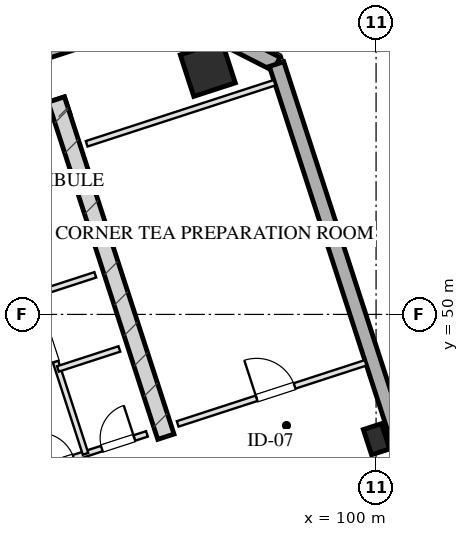
"""IFC4 building model, lengths in metres.
Left out: names, types, materials, properties, quantities, classifications, styles, units other than length and angle.
Written with IfcOpenShell. Run it as: python <this file> out.ifc"""

import sys

from ifc_helpers import new_model, si_unit, direction, frame, frame_2d, origin, origin_2d, place, context, subcontext, project, spatial, rectangle, hollow_rectangle, extrude, element, fill, save


model = new_model("IFC4")
c1 = context("Model", 3, precision=1e-05, world=origin(), true_north=direction((0.0, 1.0)))
c2 = subcontext(c1, "Body", "Model", "MODEL_VIEW")
j1 = project(units=[si_unit("LENGTHUNIT", "METRE"), si_unit("PLANEANGLEUNIT", "RADIAN")], contexts=[c1])
p1 = place(None, origin())
s1 = spatial("IfcSite", under=j1, at=p1, CompositionType="ELEMENT")
p2 = place(p1, origin())
s2 = spatial("IfcBuilding", under=s1, at=p2, CompositionType="ELEMENT")
p3 = place(p2, frame((0.0, 0.0, 209.3)))
s3 = spatial("IfcBuildingStorey", under=s2, at=p3, CompositionType="ELEMENT", Elevation=209.3)
p4 = place(p3, frame((76.415, 50.489, 0.0), z_axis=(0.0, 0.0, 1.0), x_axis=(0.951056810414, 0.309016089169, 0.0)))
e1 = element("IfcWall", 1, at=p4, inside=s3, PredefinedType="SHEAR", context=c2, shape_type="SweptSolid", body=[
    extrude(rectangle(XDim=16.25, YDim=0.45, at=frame_2d((8.125, 0.0))), origin(), (0.0, 0.0, 1.0), 3.45),
])
p5 = place(p3, frame((94.469, 46.781, 0.0), z_axis=(0.0, 0.0, 1.0), x_axis=(-0.309004419953, 0.951060601881, 0.0)))
e2 = element("IfcWall", 2, at=p5, inside=s3, PredefinedType="SHEAR", context=c2, shape_type="SweptSolid", body=[
    extrude(rectangle(XDim=9.33, YDim=0.45, at=frame_2d((4.665, 0.0))), origin(), (0.0, 0.0, 1.0), 3.45),
])
p6 = place(p3, frame((95.572, 56.461, 0.0), z_axis=(0.0, 0.0, 1.0), x_axis=(0.951056516295, 0.309016994375, 0.0)))
e3 = element("IfcColumn", 3, at=p6, inside=s3, PredefinedType="COLUMN", context=c2, shape_type="SweptSolid", body=[
    extrude(hollow_rectangle(XDim=1.15, YDim=1.15, WallThickness=0.04, at=origin_2d()), origin(), (0.0, 0.0, 1.0), 3.451),
])
p7 = place(p3, frame((100.01, 46.716, 0.0), z_axis=(0.0, 0.0, 1.0), x_axis=(0.951056516295, 0.309016994375, 0.0)))
e4 = element("IfcColumn", 4, at=p7, inside=s3, PredefinedType="COLUMN", context=c2, shape_type="SweptSolid", body=[
    extrude(hollow_rectangle(XDim=0.5, YDim=0.7, WallThickness=0.025, at=origin_2d()), origin(), (0.0, 0.0, 1.0), 3.451),
])
p8 = place(p3, frame((72.165, 50.706, 0.0), z_axis=(0.0, 0.0, 1.0), x_axis=(0.951058012937, 0.309012388148, 0.0)))
e5 = element("IfcWall", 5, at=p8, inside=s3, PredefinedType="SOLIDWALL", context=c2, shape_type="SweptSolid", body=[
    extrude(rectangle(XDim=23.6, YDim=0.4, at=frame_2d((11.8, 0.0))), origin(), (0.0, 0.0, 1.0), 2.61),
])
p9 = place(p3, frame((94.61, 57.999, 0.0), z_axis=(0.0, 0.0, 1.0), x_axis=(0.890979603174, -0.454043331334, 0.0)))
e6 = element("IfcWall", 6, at=p9, inside=s3, PredefinedType="SOLIDWALL", context=c2, shape_type="SweptSolid", body=[
    extrude(rectangle(XDim=3.111, YDim=0.4, at=frame_2d((1.556, 0.0))), origin(), (0.0, 0.0, 1.0), 2.61),
])
p10 = place(p3, frame((97.382, 56.586, 0.0), z_axis=(0.0, 0.0, 1.0), x_axis=(0.309016491071, -0.951056679828, 0.0)))
e7 = element("IfcWall", 7, at=p10, inside=s3, PredefinedType="SOLIDWALL", context=c2, shape_type="SweptSolid", body=[
    extrude(rectangle(XDim=38.4, YDim=0.4, at=frame_2d((19.2, 0.0))), origin(), (0.0, 0.0, 1.0), 2.61),
])
p11 = place(p10, frame((15.55, 0.0, 0.75)))
e8 = element("IfcOpeningElement", 8, at=p11, cuts=e7, PredefinedType="OPENING", context=c2, shape_type="SweptSolid", body=[
    extrude(rectangle(XDim=2.1, YDim=1.46, at=frame_2d((1.05, 0.73))), frame((0.0, 0.21, 0.0), z_axis=(0.0, -1.0, 0.0), x_axis=(1.0, 0.0, 0.0)), (0.0, 0.0, 1.0), 0.42),
])
p12 = place(p10, frame((11.75, 0.0, 0.75)))
e9 = element("IfcOpeningElement", 9, at=p12, cuts=e7, PredefinedType="OPENING", context=c2, shape_type="SweptSolid", body=[
    extrude(rectangle(XDim=2.1, YDim=1.46, at=frame_2d((1.05, 0.73))), frame((0.0, 0.21, 0.0), z_axis=(0.0, -1.0, 0.0), x_axis=(1.0, 0.0, 0.0)), (0.0, 0.0, 1.0), 0.42),
])
p13 = place(p10, frame((23.05, 0.0, 0.0)))
e10 = element("IfcOpeningElement", 10, at=p13, cuts=e7, PredefinedType="OPENING", context=c2, shape_type="SweptSolid", body=[
    extrude(rectangle(XDim=1.1, YDim=2.15, at=frame_2d((0.55, 1.075))), frame((0.0, 0.21, 0.0), z_axis=(0.0, -1.0, 0.0), x_axis=(1.0, 0.0, 0.0)), (0.0, 0.0, 1.0), 0.42),
])
p14 = place(p3, frame((90.928, 45.868, 0.0), z_axis=(0.0, 0.0, 1.0), x_axis=(0.951059297078, 0.309008435874, 0.0)))
e11 = element("IfcWall", 11, at=p14, inside=s3, PredefinedType="PARTITIONING", context=c2, shape_type="SweptSolid", body=[
    extrude(rectangle(XDim=3.2, YDim=0.15, at=frame_2d((1.6, 0.0))), origin(), (0.0, 0.0, 1.0), 3.175),
])
p15 = place(p14, frame((0.22, 0.0, 0.0)))
e12 = element("IfcOpeningElement", 12, at=p15, cuts=e11, PredefinedType="OPENING", context=c2, shape_type="SweptSolid", body=[
    extrude(rectangle(XDim=0.95, YDim=2.05, at=frame_2d((0.475, 1.025))), frame((0.0, 0.085, 0.0), z_axis=(0.0, -1.0, 0.0), x_axis=(1.0, 0.0, 0.0)), (0.0, 0.0, 1.0), 0.17),
])
p16 = place(p14, frame((1.95, 0.0, 0.0)))
e13 = element("IfcOpeningElement", 13, at=p16, cuts=e11, PredefinedType="OPENING", context=c2, shape_type="SweptSolid", body=[
    extrude(rectangle(XDim=0.9, YDim=2.05, at=frame_2d((0.45, 1.025))), frame((0.0, 0.085, 0.0), z_axis=(0.0, -1.0, 0.0), x_axis=(1.0, 0.0, 0.0)), (0.0, 0.0, 1.0), 0.17),
])
p17 = place(p3, frame((92.355, 46.331, 0.0), z_axis=(0.0, 0.0, 1.0), x_axis=(-0.309007490203, 0.951059604335, 0.0)))
e14 = element("IfcWall", 14, at=p17, inside=s3, PredefinedType="PARTITIONING", context=c2, shape_type="SweptSolid", body=[
    extrude(rectangle(XDim=8.43, YDim=0.15, at=frame_2d((4.215, 0.0))), origin(), (0.0, 0.0, 1.0), 3.175),
])
p18 = place(p17, frame((2.55, 0.0, 0.0)))
e15 = element("IfcOpeningElement", 15, at=p18, cuts=e14, PredefinedType="OPENING", context=c2, shape_type="SweptSolid", body=[
    extrude(rectangle(XDim=0.95, YDim=2.05, at=frame_2d((0.475, 1.025))), frame((0.0, 0.085, 0.0), z_axis=(0.0, -1.0, 0.0), x_axis=(1.0, 0.0, 0.0)), (0.0, 0.0, 1.0), 0.17),
])
p19 = place(p17, frame((5.6, 0.0, 0.0)))
e16 = element("IfcOpeningElement", 16, at=p19, cuts=e14, PredefinedType="OPENING", context=c2, shape_type="SweptSolid", body=[
    extrude(rectangle(XDim=0.9, YDim=2.05, at=frame_2d((0.45, 1.025))), frame((0.0, 0.085, 0.0), z_axis=(0.0, -1.0, 0.0), x_axis=(1.0, 0.0, 0.0)), (0.0, 0.0, 1.0), 0.17),
])
p20 = place(p3, frame((90.995, 50.516, 0.0), z_axis=(0.0, 0.0, 1.0), x_axis=(0.951040401051, 0.309066587596, 0.0)))
e17 = element("IfcWall", 17, at=p20, inside=s3, PredefinedType="PARTITIONING", context=c2, shape_type="SweptSolid", body=[
    extrude(rectangle(XDim=1.7, YDim=0.15, at=frame_2d((0.85, 0.0))), origin(), (0.0, 0.0, 1.0), 3.175),
])
p21 = place(p3, frame((91.628, 48.566, 0.0), z_axis=(0.0, 0.0, 1.0), x_axis=(0.951054116971, 0.309024378638, 0.0)))
e18 = element("IfcWall", 18, at=p21, inside=s3, PredefinedType="PARTITIONING", context=c2, shape_type="SweptSolid", body=[
    extrude(rectangle(XDim=1.7, YDim=0.15, at=frame_2d((0.85, 0.0))), origin(), (0.0, 0.0, 1.0), 3.175),
])
p22 = place(p3, frame((92.385, 54.49, 0.0), z_axis=(0.0, 0.0, 1.0), x_axis=(0.951055112834, 0.309021313752, 0.0)))
e19 = element("IfcWall", 19, at=p22, inside=s3, PredefinedType="PARTITIONING", context=c2, shape_type="SweptSolid", body=[
    extrude(rectangle(XDim=5.2, YDim=0.15, at=frame_2d((2.6, 0.0))), origin(), (0.0, 0.0, 1.0), 3.175),
])
p23 = place(p3, frame((94.78, 47.119, 0.0), z_axis=(0.0, 0.0, 1.0), x_axis=(0.951055112834, 0.309021313752, 0.0)))
e20 = element("IfcWall", 20, at=p23, inside=s3, PredefinedType="PARTITIONING", context=c2, shape_type="SweptSolid", body=[
    extrude(rectangle(XDim=5.2, YDim=0.15, at=frame_2d((2.6, 0.0))), origin(), (0.0, 0.0, 1.0), 3.175),
])
p24 = place(p23, frame((2.184, 0.0, 0.0)))
e21 = element("IfcOpeningElement", 21, at=p24, cuts=e20, PredefinedType="OPENING", context=c2, shape_type="SweptSolid", body=[
    extrude(rectangle(XDim=1.05, YDim=2.05, at=frame_2d((0.525, 1.025))), frame((0.0, 0.085, 0.0), z_axis=(0.0, -1.0, 0.0), x_axis=(1.0, 0.0, 0.0)), (0.0, 0.0, 1.0), 0.17),
])
p25 = place(p15, origin())
e22 = element("IfcDoor", 22, at=p25, inside=s3, OperationType="SINGLE_SWING_LEFT", PredefinedType="DOOR", context=c2, shape_type="SweptSolid", body=[
    extrude(rectangle(XDim=0.95, YDim=2.05, at=frame_2d((0.475, 1.025))), frame((0.0, 0.025, 0.0), z_axis=(0.0, -1.0, 0.0), x_axis=(1.0, 0.0, 0.0)), (0.0, 0.0, 1.0), 0.05),
])
fill(e12, e22)
p26 = place(p16, origin())
e23 = element("IfcDoor", 23, at=p26, inside=s3, OperationType="SINGLE_SWING_RIGHT", PredefinedType="DOOR", context=c2, shape_type="SweptSolid", body=[
    extrude(rectangle(XDim=0.9, YDim=2.05, at=frame_2d((0.45, 1.025))), frame((0.0, 0.025, 0.0), z_axis=(0.0, -1.0, 0.0), x_axis=(1.0, 0.0, 0.0)), (0.0, 0.0, 1.0), 0.05),
])
fill(e13, e23)
p27 = place(p18, origin())
e24 = element("IfcDoor", 24, at=p27, inside=s3, OperationType="SINGLE_SWING_LEFT", PredefinedType="DOOR", context=c2, shape_type="SweptSolid", body=[
    extrude(rectangle(XDim=0.95, YDim=2.05, at=frame_2d((0.475, 1.025))), frame((0.0, 0.025, 0.0), z_axis=(0.0, -1.0, 0.0), x_axis=(1.0, 0.0, 0.0)), (0.0, 0.0, 1.0), 0.05),
])
fill(e15, e24)
p28 = place(p24, origin())
e25 = element("IfcDoor", 25, at=p28, inside=s3, OperationType="SINGLE_SWING_LEFT", PredefinedType="DOOR", context=c2, shape_type="SweptSolid", body=[
    extrude(rectangle(XDim=1.05, YDim=2.05, at=frame_2d((0.525, 1.025))), frame((0.0, 0.025, 0.0), z_axis=(0.0, -1.0, 0.0), x_axis=(1.0, 0.0, 0.0)), (0.0, 0.0, 1.0), 0.05),
])
fill(e21, e25)
save(model, sys.argv[1])
